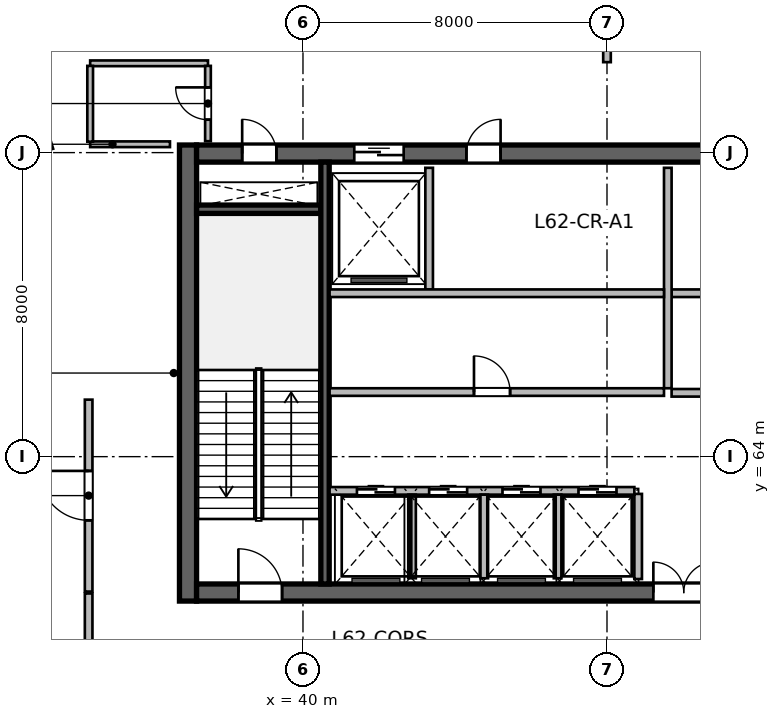
"""IFC4 building model, lengths in metres.
Left out: names, types, materials, properties, quantities, classifications, styles, units other than length and angle.
Written with IfcOpenShell. Run it as: python <this file> out.ifc"""

import sys

from ifc_helpers import new_model, si_unit, direction, frame, frame_2d, origin, place, context, subcontext, project, spatial, rectangle, extrude, source, transform, mapped, element, fill, save


model = new_model("IFC4")
c1 = context("Model", 3, precision=1e-05, world=origin(), true_north=direction((0.0, 1.0)))
c2 = subcontext(c1, "Body", "Model", "MODEL_VIEW")
j1 = project(units=[si_unit("LENGTHUNIT", "METRE"), si_unit("PLANEANGLEUNIT", "RADIAN")], contexts=[c1])
p1 = place(None, origin())
s1 = spatial("IfcSite", under=j1, at=p1, CompositionType="ELEMENT")
p2 = place(p1, origin())
s2 = spatial("IfcBuilding", under=s1, at=p2, CompositionType="ELEMENT")
p3 = place(p2, frame((0.0, 0.0, 254.7)))
s3 = spatial("IfcBuildingStorey", under=s2, at=p3, CompositionType="ELEMENT", Elevation=254.7)
m1 = source(origin(), c2, "Body", "SweptSolid", [
    extrude(rectangle(XDim=12.0, YDim=0.45, at=frame_2d((6.0, 0.0))), origin(), (0.0, 0.0, 1.0), 5.4),
])
p4 = place(p3, frame((36.975, 60.2, 0.0), z_axis=(0.0, 0.0, 1.0), x_axis=(0.0, 1.0, 0.0)))
e1 = element("IfcWall", 1, at=p4, inside=s3, PredefinedType="SHEAR", context=c2, shape_type="MappedRepresentation", body=[
    mapped(m1, transform((0.0, 0.0, 0.0), scale=1.0)),
])
m2 = source(origin(), c2, "Body", "SweptSolid", [
    extrude(rectangle(XDim=21.6, YDim=0.45, at=frame_2d((10.8, 0.0))), origin(), (0.0, 0.0, 1.0), 5.4),
])
p5 = place(p3, frame((37.2, 60.425, 0.0), z_axis=(0.0, 0.0, 1.0), x_axis=(1.0, 0.0, 0.0)))
e2 = element("IfcWall", 2, at=p5, inside=s3, PredefinedType="SHEAR", context=c2, shape_type="MappedRepresentation", body=[
    mapped(m2, transform((0.0, 0.0, 0.0), scale=1.0)),
])
p6 = place(p5, frame((1.1, 0.0, 0.0)))
e3 = element("IfcOpeningElement", 3, at=p6, cuts=e2, PredefinedType="OPENING", context=c2, shape_type="SweptSolid", body=[
    extrude(rectangle(XDim=1.15, YDim=2.15, at=frame_2d((0.575, 1.075))), frame((0.0, 0.235, 0.0), z_axis=(0.0, -1.0, 0.0), x_axis=(1.0, 0.0, 0.0)), (0.0, 0.0, 1.0), 0.47),
])
p7 = place(p5, frame((19.5, 0.0, 0.0)))
e4 = element("IfcOpeningElement", 4, at=p7, cuts=e2, PredefinedType="OPENING", context=c2, shape_type="SweptSolid", body=[
    extrude(rectangle(XDim=0.9, YDim=2.1, at=frame_2d((0.45, 1.05))), frame((0.0, 0.235, 0.0), z_axis=(0.0, -1.0, 0.0), x_axis=(1.0, 0.0, 0.0)), (0.0, 0.0, 1.0), 0.47),
])
p8 = place(p5, frame((12.02, 0.0, 0.0)))
e5 = element("IfcOpeningElement", 5, at=p8, cuts=e2, PredefinedType="OPENING", context=c2, shape_type="SweptSolid", body=[
    extrude(rectangle(XDim=1.6, YDim=2.15, at=frame_2d((0.8, 1.075))), frame((0.0, 0.235, 0.0), z_axis=(0.0, -1.0, 0.0), x_axis=(1.0, 0.0, 0.0)), (0.0, 0.0, 1.0), 0.47),
])
p9 = place(p3, frame((37.2, 71.975, 0.0), z_axis=(0.0, 0.0, 1.0), x_axis=(1.0, 0.0, 0.0)))
e6 = element("IfcWall", 6, at=p9, inside=s3, PredefinedType="SHEAR", context=c2, shape_type="MappedRepresentation", body=[
    mapped(m2, transform((0.0, 0.0, 0.0), scale=1.0)),
])
p10 = place(p9, frame((1.2, 0.0, 0.0)))
e7 = element("IfcOpeningElement", 7, at=p10, cuts=e6, PredefinedType="OPENING", context=c2, shape_type="SweptSolid", body=[
    extrude(rectangle(XDim=0.9, YDim=2.1, at=frame_2d((0.45, 1.05))), frame((0.0, 0.235, 0.0), z_axis=(0.0, -1.0, 0.0), x_axis=(1.0, 0.0, 0.0)), (0.0, 0.0, 1.0), 0.47),
])
p11 = place(p9, frame((14.7, 0.0, 0.0)))
e8 = element("IfcOpeningElement", 8, at=p11, cuts=e6, PredefinedType="OPENING", context=c2, shape_type="SweptSolid", body=[
    extrude(rectangle(XDim=1.2, YDim=2.15, at=frame_2d((0.6, 1.075))), frame((0.0, 0.235, 0.0), z_axis=(0.0, -1.0, 0.0), x_axis=(1.0, 0.0, 0.0)), (0.0, 0.0, 1.0), 0.47),
])
p12 = place(p9, frame((4.15, 0.0, 0.0)))
e9 = element("IfcOpeningElement", 9, at=p12, cuts=e6, PredefinedType="OPENING", context=c2, shape_type="SweptSolid", body=[
    extrude(rectangle(XDim=1.3, YDim=2.15, at=frame_2d((0.65, 1.075))), frame((0.0, 0.235, 0.0), z_axis=(0.0, -1.0, 0.0), x_axis=(1.0, 0.0, 0.0)), (0.0, 0.0, 1.0), 0.47),
])
p13 = place(p9, frame((7.1, 0.0, 0.0)))
e10 = element("IfcOpeningElement", 10, at=p13, cuts=e6, PredefinedType="OPENING", context=c2, shape_type="SweptSolid", body=[
    extrude(rectangle(XDim=0.9, YDim=2.1, at=frame_2d((0.45, 1.05))), frame((0.0, 0.235, 0.0), z_axis=(0.0, -1.0, 0.0), x_axis=(1.0, 0.0, 0.0)), (0.0, 0.0, 1.0), 0.47),
])
m3 = source(origin(), c2, "Body", "SweptSolid", [
    extrude(rectangle(XDim=3.27, YDim=0.22, at=frame_2d((1.635, 0.0))), origin(), (0.0, 0.0, 1.0), 5.4),
])
p14 = place(p3, frame((37.2, 70.51, 0.0), z_axis=(0.0, 0.0, 1.0), x_axis=(1.0, 0.0, 0.0)))
e11 = element("IfcWall", 11, at=p14, inside=s3, PredefinedType="SHEAR", context=c2, shape_type="MappedRepresentation", body=[
    mapped(m3, transform((0.0, 0.0, 0.0), scale=1.0)),
])
m4 = source(origin(), c2, "Body", "SweptSolid", [
    extrude(rectangle(XDim=11.1, YDim=0.22, at=frame_2d((5.55, 0.0))), origin(), (0.0, 0.0, 1.0), 5.4),
])
p15 = place(p3, frame((40.58, 60.65, 0.0), z_axis=(0.0, 0.0, 1.0), x_axis=(0.0, 1.0, 0.0)))
e12 = element("IfcWall", 12, at=p15, inside=s3, PredefinedType="SHEAR", context=c2, shape_type="MappedRepresentation", body=[
    mapped(m4, transform((0.0, 0.0, 0.0), scale=1.0)),
])
m5 = source(origin(), c2, "Body", "SweptSolid", [
    extrude(rectangle(XDim=2.24, YDim=0.2, at=frame_2d((1.12, 0.0))), origin(), (0.0, 0.0, 1.0), 5.15),
])
p16 = place(p3, frame((48.82, 60.78, 0.0), z_axis=(0.0, 0.0, 1.0), x_axis=(0.0, 1.0, 0.0)))
e13 = element("IfcWall", 13, at=p16, inside=s3, PredefinedType="SOLIDWALL", context=c2, shape_type="MappedRepresentation", body=[
    mapped(m5, transform((0.0, 0.0, 0.0), scale=1.0)),
])
m6 = source(origin(), c2, "Body", "SweptSolid", [
    extrude(rectangle(XDim=5.62, YDim=0.2, at=frame_2d((2.81, 0.0))), origin(), (0.0, 0.0, 1.0), 5.15),
])
p17 = place(p3, frame((49.7, 68.3, 0.0), z_axis=(0.0, 0.0, 1.0), x_axis=(1.0, 0.0, 0.0)))
e14 = element("IfcWall", 14, at=p17, inside=s3, PredefinedType="SOLIDWALL", context=c2, shape_type="MappedRepresentation", body=[
    mapped(m6, transform((0.0, 0.0, 0.0), scale=1.0)),
])
p18 = place(p17, frame((1.6, 0.0, 0.0)))
e15 = element("IfcOpeningElement", 15, at=p18, cuts=e14, PredefinedType="OPENING", context=c2, shape_type="SweptSolid", body=[
    extrude(rectangle(XDim=1.1, YDim=2.15, at=frame_2d((0.55, 1.075))), frame((0.0, 0.11, 0.0), z_axis=(0.0, -1.0, 0.0), x_axis=(1.0, 0.0, 0.0)), (0.0, 0.0, 1.0), 0.22),
])
p19 = place(p17, frame((3.7, 0.0, 0.0)))
e16 = element("IfcOpeningElement", 16, at=p19, cuts=e14, PredefinedType="OPENING", context=c2, shape_type="SweptSolid", body=[
    extrude(rectangle(XDim=1.1, YDim=2.15, at=frame_2d((0.55, 1.075))), frame((0.0, 0.11, 0.0), z_axis=(0.0, -1.0, 0.0), x_axis=(1.0, 0.0, 0.0)), (0.0, 0.0, 1.0), 0.22),
])
m7 = source(origin(), c2, "Body", "SweptSolid", [
    extrude(rectangle(XDim=5.8, YDim=0.2, at=frame_2d((2.9, 0.0))), origin(), (0.0, 0.0, 1.0), 5.15),
])
p20 = place(p3, frame((49.6, 65.8, 0.0), z_axis=(0.0, 0.0, 1.0), x_axis=(0.0, 1.0, 0.0)))
e17 = element("IfcWall", 17, at=p20, inside=s3, PredefinedType="SOLIDWALL", context=c2, shape_type="MappedRepresentation", body=[
    mapped(m7, transform((0.0, 0.0, 0.0), scale=1.0)),
])
p21 = place(p3, frame((49.7, 65.68, 0.0), z_axis=(0.0, 0.0, 1.0), x_axis=(1.0, 0.0, 0.0)))
e18 = element("IfcWall", 18, at=p21, inside=s3, PredefinedType="SOLIDWALL", context=c2, shape_type="MappedRepresentation", body=[
    mapped(m6, transform((0.0, 0.0, 0.0), scale=1.0)),
])
m8 = source(origin(), c2, "Body", "SweptSolid", [
    extrude(rectangle(XDim=3.2, YDim=0.2, at=frame_2d((1.6, 0.0))), origin(), (0.0, 0.0, 1.0), 5.15),
])
p22 = place(p3, frame((43.32, 68.4, 0.0), z_axis=(0.0, 0.0, 1.0), x_axis=(0.0, 1.0, 0.0)))
e19 = element("IfcWall", 19, at=p22, inside=s3, PredefinedType="SOLIDWALL", context=c2, shape_type="MappedRepresentation", body=[
    mapped(m8, transform((0.0, 0.0, 0.0), scale=1.0)),
])
m9 = source(origin(), c2, "Body", "SweptSolid", [
    extrude(rectangle(XDim=8.8, YDim=0.2, at=frame_2d((4.4, 0.0))), origin(), (0.0, 0.0, 1.0), 5.15),
])
p23 = place(p3, frame((40.7, 68.3, 0.0), z_axis=(0.0, 0.0, 1.0), x_axis=(1.0, 0.0, 0.0)))
e20 = element("IfcWall", 20, at=p23, inside=s3, PredefinedType="SOLIDWALL", context=c2, shape_type="MappedRepresentation", body=[
    mapped(m9, transform((0.0, 0.0, 0.0), scale=1.0)),
])
m10 = source(origin(), c2, "Body", "SweptSolid", [
    extrude(rectangle(XDim=8.02, YDim=0.2, at=frame_2d((4.01, 0.0))), origin(), (0.0, 0.0, 1.0), 5.15),
])
p24 = place(p3, frame((40.7, 63.1, 0.0), z_axis=(0.0, 0.0, 1.0), x_axis=(1.0, 0.0, 0.0)))
e21 = element("IfcWall", 21, at=p24, inside=s3, PredefinedType="SOLIDWALL", context=c2, shape_type="MappedRepresentation", body=[
    mapped(m10, transform((0.0, 0.0, 0.0), scale=1.0)),
])
p25 = place(p24, frame((0.72, 0.0, 0.0)))
e22 = element("IfcOpeningElement", 22, at=p25, cuts=e21, PredefinedType="OPENING", context=c2, shape_type="SweptSolid", body=[
    extrude(rectangle(XDim=1.0, YDim=2.15, at=frame_2d((0.5, 1.075))), frame((0.0, 0.11, 0.0), z_axis=(0.0, -1.0, 0.0), x_axis=(1.0, 0.0, 0.0)), (0.0, 0.0, 1.0), 0.22),
])
p26 = place(p24, frame((2.62, 0.0, 0.0)))
e23 = element("IfcOpeningElement", 23, at=p26, cuts=e21, PredefinedType="OPENING", context=c2, shape_type="SweptSolid", body=[
    extrude(rectangle(XDim=1.0, YDim=2.15, at=frame_2d((0.5, 1.075))), frame((0.0, 0.11, 0.0), z_axis=(0.0, -1.0, 0.0), x_axis=(1.0, 0.0, 0.0)), (0.0, 0.0, 1.0), 0.22),
])
p27 = place(p24, frame((4.55, 0.0, 0.0)))
e24 = element("IfcOpeningElement", 24, at=p27, cuts=e21, PredefinedType="OPENING", context=c2, shape_type="SweptSolid", body=[
    extrude(rectangle(XDim=1.0, YDim=2.15, at=frame_2d((0.5, 1.075))), frame((0.0, 0.11, 0.0), z_axis=(0.0, -1.0, 0.0), x_axis=(1.0, 0.0, 0.0)), (0.0, 0.0, 1.0), 0.22),
])
p28 = place(p24, frame((6.55, 0.0, 0.0)))
e25 = element("IfcOpeningElement", 25, at=p28, cuts=e21, PredefinedType="OPENING", context=c2, shape_type="SweptSolid", body=[
    extrude(rectangle(XDim=1.0, YDim=2.15, at=frame_2d((0.5, 1.075))), frame((0.0, 0.11, 0.0), z_axis=(0.0, -1.0, 0.0), x_axis=(1.0, 0.0, 0.0)), (0.0, 0.0, 1.0), 0.22),
])
m11 = source(origin(), c2, "Body", "SweptSolid", [
    extrude(rectangle(XDim=2.2, YDim=0.2, at=frame_2d((1.1, 0.0))), origin(), (0.0, 0.0, 1.0), 5.15),
])
for number, where, z_axis, x_axis in (
    (26, (42.87, 60.8, 0.0), (0.0, 0.0, 1.0), (0.0, 1.0, 0.0)),
    (27, (44.77, 60.8, 0.0), (0.0, 0.0, 1.0), (0.0, 1.0, 0.0)),
    (28, (46.7, 60.8, 0.0), (0.0, 0.0, 1.0), (0.0, 1.0, 0.0)),
):
    element("IfcWall", number, at=place(p3, frame(where, z_axis=z_axis, x_axis=x_axis)), inside=s3, PredefinedType="SOLIDWALL", context=c2, shape_type="MappedRepresentation", body=[
        mapped(m11, transform((0.0, 0.0, 0.0), scale=1.0)),
    ])
p29 = place(p3, frame((40.7, 65.7, 0.0), z_axis=(0.0, 0.0, 1.0), x_axis=(1.0, 0.0, 0.0)))
e29 = element("IfcWall", 29, at=p29, inside=s3, PredefinedType="SOLIDWALL", context=c2, shape_type="MappedRepresentation", body=[
    mapped(m9, transform((0.0, 0.0, 0.0), scale=1.0)),
])
p30 = place(p29, frame((3.8, 0.0, 0.0)))
e30 = element("IfcOpeningElement", 30, at=p30, cuts=e29, PredefinedType="OPENING", context=c2, shape_type="SweptSolid", body=[
    extrude(rectangle(XDim=0.95, YDim=2.15, at=frame_2d((0.475, 1.075))), frame((0.0, 0.11, 0.0), z_axis=(0.0, -1.0, 0.0), x_axis=(1.0, 0.0, 0.0)), (0.0, 0.0, 1.0), 0.22),
])
m12 = source(origin(), c2, "Body", "SweptSolid", [
    extrude(rectangle(XDim=2.1, YDim=0.15, at=frame_2d((1.05, 0.0))), origin(), (0.0, 0.0, 1.0), 5.15),
])
p31 = place(p3, frame((34.4, 72.22, 0.0), z_axis=(0.0, 0.0, 1.0), x_axis=(1.0, 0.0, 0.0)))
e31 = element("IfcWall", 31, at=p31, inside=s3, PredefinedType="PARTITIONING", context=c2, shape_type="MappedRepresentation", body=[
    mapped(m12, transform((0.0, 0.0, 0.0), scale=1.0)),
])
m13 = source(origin(), c2, "Body", "SweptSolid", [
    extrude(rectangle(XDim=3.1, YDim=0.15, at=frame_2d((1.55, 0.0))), origin(), (0.0, 0.0, 1.0), 2.425),
])
p32 = place(p3, frame((34.4, 74.35, 0.0), z_axis=(0.0, 0.0, 1.0), x_axis=(1.0, 0.0, 0.0)))
e32 = element("IfcWall", 32, at=p32, inside=s3, PredefinedType="PARTITIONING", context=c2, shape_type="MappedRepresentation", body=[
    mapped(m13, transform((0.0, 0.0, 0.0), scale=1.0)),
])
m14 = source(origin(), c2, "Body", "SweptSolid", [
    extrude(rectangle(XDim=1.995, YDim=0.15, at=frame_2d((0.998, 0.0))), origin(), (0.0, 0.0, 1.0), 5.15),
])
p33 = place(p3, frame((34.4, 72.288, 0.0), z_axis=(0.0, 0.0, 1.0), x_axis=(0.0, 1.0, 0.0)))
e33 = element("IfcWall", 33, at=p33, inside=s3, PredefinedType="PARTITIONING", context=c2, shape_type="MappedRepresentation", body=[
    mapped(m14, transform((0.0, 0.0, 0.0), scale=1.0)),
])
m15 = source(origin(), c2, "Body", "SweptSolid", [
    extrude(rectangle(XDim=1.982, YDim=0.15, at=frame_2d((0.991, 0.0))), origin(), (0.0, 0.0, 1.0), 5.15),
])
p34 = place(p3, frame((37.5, 72.3, 0.0), z_axis=(0.0, 0.0, 1.0), x_axis=(0.0, 1.0, 0.0)))
e34 = element("IfcWall", 34, at=p34, inside=s3, PredefinedType="PARTITIONING", context=c2, shape_type="MappedRepresentation", body=[
    mapped(m15, transform((0.0, 0.0, 0.0), scale=1.0)),
])
p35 = place(p34, frame((0.566, 0.0, 0.0)))
e35 = element("IfcOpeningElement", 35, at=p35, cuts=e34, PredefinedType="OPENING", context=c2, shape_type="SweptSolid", body=[
    extrude(rectangle(XDim=0.85, YDim=2.1, at=frame_2d((0.425, 1.05))), frame((0.0, 0.085, 0.0), z_axis=(0.0, -1.0, 0.0), x_axis=(1.0, 0.0, 0.0)), (0.0, 0.0, 1.0), 0.17),
])
m16 = source(origin(), c2, "Body", "SweptSolid", [
    extrude(rectangle(XDim=5.137, YDim=0.2, at=frame_2d((2.568, 0.0))), origin(), (0.0, 0.0, 1.0), 4.508),
])
p36 = place(p3, frame((48.0, 74.38, 0.0), z_axis=(0.0, 0.0, 1.0), x_axis=(0.0, 1.0, 0.0)))
e36 = element("IfcWall", 36, at=p36, inside=s3, PredefinedType="SOLIDWALL", context=c2, shape_type="MappedRepresentation", body=[
    mapped(m16, transform((0.0, 0.0, 0.0), scale=1.0)),
])
m17 = source(origin(), c2, "Body", "SweptSolid", [
    extrude(rectangle(XDim=13.511, YDim=0.2, at=frame_2d((6.755, 0.0))), origin(), (0.0, 0.0, 1.0), 5.15),
])
p37 = place(p3, frame((34.36, 46.889, 0.0), z_axis=(0.0, 0.0, 1.0), x_axis=(0.0, 1.0, 0.0)))
e37 = element("IfcWall", 37, at=p37, inside=s3, PredefinedType="SOLIDWALL", context=c2, shape_type="MappedRepresentation", body=[
    mapped(m17, transform((0.0, 0.0, 0.0), scale=1.0)),
])
m18 = source(origin(), c2, "Body", "SweptSolid", [
    extrude(rectangle(XDim=5.05, YDim=0.2, at=frame_2d((2.525, 0.0))), origin(), (0.0, 0.0, 1.0), 5.15),
])
p38 = place(p3, frame((34.36, 60.45, 0.0), z_axis=(0.0, 0.0, 1.0), x_axis=(0.0, 1.0, 0.0)))
e38 = element("IfcWall", 38, at=p38, inside=s3, PredefinedType="SOLIDWALL", context=c2, shape_type="MappedRepresentation", body=[
    mapped(m18, transform((0.0, 0.0, 0.0), scale=1.0)),
])
p39 = place(p38, frame((1.875, 0.0, 0.0)))
e39 = element("IfcOpeningElement", 39, at=p39, cuts=e38, PredefinedType="OPENING", context=c2, shape_type="SweptSolid", body=[
    extrude(rectangle(XDim=1.3, YDim=2.15, at=frame_2d((0.65, 1.075))), frame((0.0, 0.11, 0.0), z_axis=(0.0, -1.0, 0.0), x_axis=(1.0, 0.0, 0.0)), (0.0, 0.0, 1.0), 0.22),
])
m19 = source(origin(), c2, "Body", "SweptSolid", [
    extrude(rectangle(XDim=1.15, YDim=2.15, at=frame_2d((0.575, 1.075))), frame((0.0, 0.025, 0.0), z_axis=(0.0, -1.0, 0.0), x_axis=(1.0, 0.0, 0.0)), (0.0, 0.0, 1.0), 0.05),
])
p40 = place(p6, origin())
e40 = element("IfcDoor", 40, at=p40, inside=s3, OperationType="SINGLE_SWING_LEFT", PredefinedType="DOOR", context=c2, shape_type="MappedRepresentation", body=[
    mapped(m19, transform((0.0, 0.0, 0.0), scale=1.0)),
])
fill(e3, e40)
m20 = source(origin(), c2, "Body", "SweptSolid", [
    extrude(rectangle(XDim=0.9, YDim=2.1, at=frame_2d((0.45, 1.05))), frame((0.0, 0.025, 0.0), z_axis=(0.0, -1.0, 0.0), x_axis=(1.0, 0.0, 0.0)), (0.0, 0.0, 1.0), 0.05),
])
p41 = place(p10, origin())
e41 = element("IfcDoor", 41, at=p41, inside=s3, OperationType="SINGLE_SWING_LEFT", PredefinedType="DOOR", context=c2, shape_type="MappedRepresentation", body=[
    mapped(m20, transform((0.0, 0.0, 0.0), scale=1.0)),
])
fill(e7, e41)
m21 = source(origin(), c2, "Body", "SweptSolid", [
    extrude(rectangle(XDim=1.6, YDim=2.15, at=frame_2d((0.8, 1.075))), frame((0.0, 0.025, 0.0), z_axis=(0.0, -1.0, 0.0), x_axis=(1.0, 0.0, 0.0)), (0.0, 0.0, 1.0), 0.05),
])
p42 = place(p8, origin())
e42 = element("IfcDoor", 42, at=p42, inside=s3, OperationType="DOUBLE_DOOR_SINGLE_SWING", PredefinedType="DOOR", context=c2, shape_type="MappedRepresentation", body=[
    mapped(m21, transform((0.0, 0.0, 0.0), scale=1.0)),
])
fill(e5, e42)
m22 = source(origin(), c2, "Body", "SweptSolid", [
    extrude(rectangle(XDim=1.3, YDim=2.15, at=frame_2d((0.65, 1.075))), frame((0.0, 0.025, 0.0), z_axis=(0.0, -1.0, 0.0), x_axis=(1.0, 0.0, 0.0)), (0.0, 0.0, 1.0), 0.05),
])
p43 = place(p12, origin())
e43 = element("IfcDoor", 43, at=p43, inside=s3, OperationType="DOUBLE_DOOR_SLIDING", PredefinedType="DOOR", context=c2, shape_type="MappedRepresentation", body=[
    mapped(m22, transform((0.0, 0.0, 0.0), scale=1.0)),
])
fill(e9, e43)
p44 = place(p13, origin())
e44 = element("IfcDoor", 44, at=p44, inside=s3, OperationType="SINGLE_SWING_RIGHT", PredefinedType="DOOR", context=c2, shape_type="MappedRepresentation", body=[
    mapped(m20, transform((0.0, 0.0, 0.0), scale=1.0)),
])
fill(e10, e44)
m23 = source(origin(), c2, "Body", "SweptSolid", [
    extrude(rectangle(XDim=1.0, YDim=2.15, at=frame_2d((0.5, 1.075))), frame((0.0, 0.025, 0.0), z_axis=(0.0, -1.0, 0.0), x_axis=(1.0, 0.0, 0.0)), (0.0, 0.0, 1.0), 0.05),
])
p45 = place(p25, origin())
e45 = element("IfcDoor", 45, at=p45, inside=s3, OperationType="DOUBLE_DOOR_SLIDING", PredefinedType="DOOR", context=c2, shape_type="MappedRepresentation", body=[
    mapped(m23, transform((0.0, 0.0, 0.0), scale=1.0)),
])
fill(e22, e45)
p46 = place(p26, origin())
e46 = element("IfcDoor", 46, at=p46, inside=s3, OperationType="DOUBLE_DOOR_SLIDING", PredefinedType="DOOR", context=c2, shape_type="MappedRepresentation", body=[
    mapped(m23, transform((0.0, 0.0, 0.0), scale=1.0)),
])
fill(e23, e46)
p47 = place(p27, origin())
e47 = element("IfcDoor", 47, at=p47, inside=s3, OperationType="DOUBLE_DOOR_SLIDING", PredefinedType="DOOR", context=c2, shape_type="MappedRepresentation", body=[
    mapped(m23, transform((0.0, 0.0, 0.0), scale=1.0)),
])
fill(e24, e47)
p48 = place(p28, origin())
e48 = element("IfcDoor", 48, at=p48, inside=s3, OperationType="DOUBLE_DOOR_SLIDING", PredefinedType="DOOR", context=c2, shape_type="MappedRepresentation", body=[
    mapped(m23, transform((0.0, 0.0, 0.0), scale=1.0)),
])
fill(e25, e48)
m24 = source(origin(), c2, "Body", "SweptSolid", [
    extrude(rectangle(XDim=0.95, YDim=2.15, at=frame_2d((0.475, 1.075))), frame((0.0, 0.025, 0.0), z_axis=(0.0, -1.0, 0.0), x_axis=(1.0, 0.0, 0.0)), (0.0, 0.0, 1.0), 0.05),
])
p49 = place(p30, origin())
e49 = element("IfcDoor", 49, at=p49, inside=s3, OperationType="SINGLE_SWING_LEFT", PredefinedType="DOOR", context=c2, shape_type="MappedRepresentation", body=[
    mapped(m24, transform((0.0, 0.0, 0.0), scale=1.0)),
])
fill(e30, e49)
m25 = source(origin(), c2, "Body", "SweptSolid", [
    extrude(rectangle(XDim=0.85, YDim=2.1, at=frame_2d((0.425, 1.05))), frame((0.0, 0.025, 0.0), z_axis=(0.0, -1.0, 0.0), x_axis=(1.0, 0.0, 0.0)), (0.0, 0.0, 1.0), 0.05),
])
p50 = place(p35, origin())
e50 = element("IfcDoor", 50, at=p50, inside=s3, OperationType="SINGLE_SWING_RIGHT", PredefinedType="DOOR", context=c2, shape_type="MappedRepresentation", body=[
    mapped(m25, transform((0.0, 0.0, 0.0), scale=1.0)),
])
fill(e35, e50)
m26 = source(origin(), c2, "Body", "SweptSolid", [
    extrude(rectangle(XDim=1.3, YDim=2.15, at=frame_2d((0.65, 1.075))), frame((0.0, 0.025, 0.0), z_axis=(0.0, -1.0, 0.0), x_axis=(1.0, 0.0, 0.0)), (0.0, 0.0, 1.0), 0.05),
])
p51 = place(p39, origin())
e51 = element("IfcDoor", 51, at=p51, inside=s3, OperationType="SINGLE_SWING_RIGHT", PredefinedType="DOOR", context=c2, shape_type="MappedRepresentation", body=[
    mapped(m26, transform((0.0, 0.0, 0.0), scale=1.0)),
])
fill(e39, e51)
save(model, sys.argv[1])
